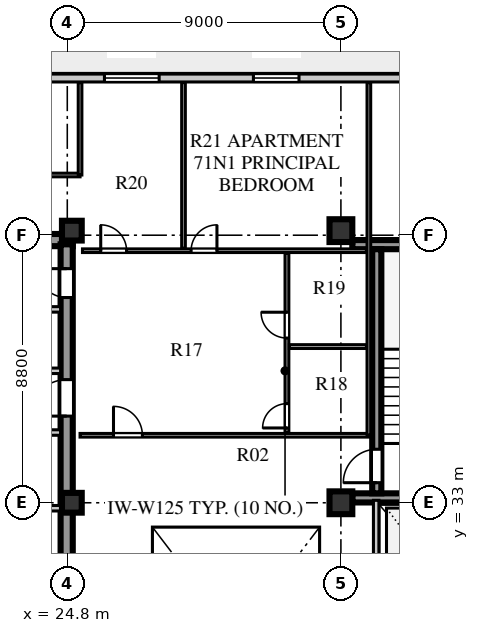
"""IFC4 building model, lengths in metres.
Left out: names, types, materials, properties, quantities, classifications, styles, units other than length and angle.
Written with IfcOpenShell. Run it as: python <this file> out.ifc"""

import sys

from ifc_helpers import new_model, si_unit, direction, frame, frame_2d, origin, origin_2d, place, context, subcontext, project, spatial, rectangle, extrude, element, fill, save


model = new_model("IFC4")
c1 = context("Model", 3, precision=1e-05, world=origin(), true_north=direction((0.0, 1.0)))
c2 = subcontext(c1, "Body", "Model", "MODEL_VIEW")
j1 = project(units=[si_unit("LENGTHUNIT", "METRE"), si_unit("PLANEANGLEUNIT", "RADIAN")], contexts=[c1])
p1 = place(None, origin())
s1 = spatial("IfcSite", under=j1, at=p1, CompositionType="ELEMENT")
p2 = place(p1, origin())
s2 = spatial("IfcBuilding", under=s1, at=p2, CompositionType="ELEMENT")
p3 = place(p2, frame((0.0, 0.0, 288.2)))
s3 = spatial("IfcBuildingStorey", under=s2, at=p3, CompositionType="ELEMENT", Elevation=288.2)
p4 = place(p3, frame((15.5, 41.64, 0.0), z_axis=(0.0, 0.0, 1.0), x_axis=(1.0, 0.0, 0.0)))
e1 = element("IfcWall", 1, at=p4, inside=s3, PredefinedType="SHEAR", context=c2, shape_type="SweptSolid", body=[
    extrude(rectangle(XDim=9.48, YDim=0.4, at=frame_2d((4.74, 0.0))), origin(), (0.0, 0.0, 1.0), 3.66),
])
p5 = place(p3, frame((24.78, 15.74, 0.0), z_axis=(0.0, 0.0, 1.0), x_axis=(0.0, 1.0, 0.0)))
e2 = element("IfcWall", 2, at=p5, inside=s3, PredefinedType="SHEAR", context=c2, shape_type="SweptSolid", body=[
    extrude(rectangle(XDim=25.76, YDim=0.4, at=frame_2d((12.88, 0.0))), origin(), (0.0, 0.0, 1.0), 3.66),
])
p6 = place(p5, frame((1.61, 0.0, 0.0)))
e3 = element("IfcOpeningElement", 3, at=p6, cuts=e2, PredefinedType="OPENING", context=c2, shape_type="SweptSolid", body=[
    extrude(rectangle(XDim=1.2, YDim=2.1, at=frame_2d((0.6, 1.05))), frame((0.0, 0.21, 0.0), z_axis=(0.0, -1.0, 0.0), x_axis=(1.0, 0.0, 0.0)), (0.0, 0.0, 1.0), 0.42),
])
p7 = place(p5, frame((6.78, 0.0, 0.0)))
e4 = element("IfcOpeningElement", 4, at=p7, cuts=e2, PredefinedType="OPENING", context=c2, shape_type="SweptSolid", body=[
    extrude(rectangle(XDim=0.85, YDim=2.06, at=frame_2d((0.425, 1.03))), frame((0.0, 0.21, 0.0), z_axis=(0.0, -1.0, 0.0), x_axis=(1.0, 0.0, 0.0)), (0.0, 0.0, 1.0), 0.42),
])
p8 = place(p5, frame((12.11, 0.0, 0.0)))
e5 = element("IfcOpeningElement", 5, at=p8, cuts=e2, PredefinedType="OPENING", context=c2, shape_type="SweptSolid", body=[
    extrude(rectangle(XDim=1.5, YDim=2.12, at=frame_2d((0.75, 1.06))), frame((0.0, 0.21, 0.0), z_axis=(0.0, -1.0, 0.0), x_axis=(1.0, 0.0, 0.0)), (0.0, 0.0, 1.0), 0.42),
])
p9 = place(p5, frame((20.11, 0.0, 0.0)))
e6 = element("IfcOpeningElement", 6, at=p9, cuts=e2, PredefinedType="OPENING", context=c2, shape_type="SweptSolid", body=[
    extrude(rectangle(XDim=1.2, YDim=2.12, at=frame_2d((0.6, 1.06))), frame((0.0, 0.21, 0.0), z_axis=(0.0, -1.0, 0.0), x_axis=(1.0, 0.0, 0.0)), (0.0, 0.0, 1.0), 0.42),
])
p10 = place(p5, frame((24.01, 0.0, 0.0)))
e7 = element("IfcOpeningElement", 7, at=p10, cuts=e2, PredefinedType="OPENING", context=c2, shape_type="SweptSolid", body=[
    extrude(rectangle(XDim=0.95, YDim=2.1, at=frame_2d((0.475, 1.05))), frame((0.0, 0.21, 0.0), z_axis=(0.0, -1.0, 0.0), x_axis=(1.0, 0.0, 0.0)), (0.0, 0.0, 1.0), 0.42),
])
for number, where, z_axis, x_axis in (
    (8, (34.175, 33.16, 0.0), (0.0, 0.0, 1.0), (1.0, 0.0, 0.0)),
    (9, (34.175, 41.49, 0.0), (0.0, 0.0, 1.0), (1.0, 0.0, 0.0)),
):
    element("IfcWall", number, at=place(p3, frame(where, z_axis=z_axis, x_axis=x_axis)), inside=s3, PredefinedType="SHEAR", context=c2, shape_type="SweptSolid", body=[
        extrude(rectangle(XDim=4.695, YDim=0.3, at=frame_2d((2.348, 0.0))), origin(), (0.0, 0.0, 1.0), 3.66),
    ])
p11 = place(p3, frame((34.98, 33.31, 0.0), z_axis=(0.0, 0.0, 1.0), x_axis=(0.0, 1.0, 0.0)))
e10 = element("IfcWall", 10, at=p11, inside=s3, PredefinedType="SHEAR", context=c2, shape_type="SweptSolid", body=[
    extrude(rectangle(XDim=8.03, YDim=0.3, at=frame_2d((4.015, 0.0))), origin(), (0.0, 0.0, 1.0), 3.66),
])
p12 = place(p11, frame((0.35, 0.0, 0.0)))
e11 = element("IfcOpeningElement", 11, at=p12, cuts=e10, PredefinedType="OPENING", context=c2, shape_type="SweptSolid", body=[
    extrude(rectangle(XDim=1.1, YDim=2.1, at=frame_2d((0.55, 1.05))), frame((0.0, 0.16, 0.0), z_axis=(0.0, -1.0, 0.0), x_axis=(1.0, 0.0, 0.0)), (0.0, 0.0, 1.0), 0.32),
])
for number, where, z_axis, x_axis in (
    (12, (24.95, 33.0, 0.0), (0.0, 0.0, 1.0), (1.0, 0.0, 0.0)),
    (13, (24.95, 41.95, 0.0), (0.0, 0.0, 1.0), (1.0, 0.0, 0.0)),
):
    element("IfcColumn", number, at=place(p3, frame(where, z_axis=z_axis, x_axis=x_axis)), inside=s3, PredefinedType="COLUMN", context=c2, shape_type="SweptSolid", body=[
        extrude(rectangle(XDim=0.65, YDim=0.65, at=origin_2d()), origin(), (0.0, 0.0, 1.0), 3.66),
    ])
for number, where, z_axis, x_axis in (
    (14, (33.8, 33.0, 0.0), (0.0, 0.0, 1.0), (1.0, 0.0, 0.0)),
    (15, (33.8, 41.95, 0.0), (0.0, 0.0, 1.0), (1.0, 0.0, 0.0)),
):
    element("IfcColumn", number, at=place(p3, frame(where, z_axis=z_axis, x_axis=x_axis)), inside=s3, PredefinedType="COLUMN", context=c2, shape_type="SweptSolid", body=[
        extrude(rectangle(XDim=0.75, YDim=0.75, at=origin_2d()), origin(), (0.0, 0.0, 1.0), 3.66),
    ])
p13 = place(p3, frame((45.15, 46.97, 0.0), z_axis=(0.0, 0.0, 1.0), x_axis=(-1.0, 0.0, 0.0)))
e16 = element("IfcWall", 16, at=p13, inside=s3, PredefinedType="SOLIDWALL", context=c2, shape_type="SweptSolid", body=[
    extrude(rectangle(XDim=31.7, YDim=0.26, at=frame_2d((15.85, 0.0))), origin(), (0.0, 0.0, 1.0), 3.66),
])
p14 = place(p13, frame((29.75, 0.0, 0.0)))
e17 = element("IfcOpeningElement", 17, at=p14, cuts=e16, PredefinedType="OPENING", context=c2, shape_type="SweptSolid", body=[
    extrude(rectangle(XDim=1.0, YDim=2.05, at=frame_2d((0.5, 1.025))), frame((0.0, 0.14, 0.0), z_axis=(0.0, -1.0, 0.0), x_axis=(1.0, 0.0, 0.0)), (0.0, 0.0, 1.0), 0.28),
])
p15 = place(p13, frame((23.74, 0.0, 0.8)))
e18 = element("IfcOpeningElement", 18, at=p15, cuts=e16, PredefinedType="OPENING", context=c2, shape_type="SweptSolid", body=[
    extrude(rectangle(XDim=2.25, YDim=2.0, at=frame_2d((1.125, 1.0))), frame((0.0, 0.14, 0.0), z_axis=(0.0, -1.0, 0.0), x_axis=(1.0, 0.0, 0.0)), (0.0, 0.0, 1.0), 0.28),
])
p16 = place(p13, frame((17.328, 0.0, 0.8)))
e19 = element("IfcOpeningElement", 19, at=p16, cuts=e16, PredefinedType="OPENING", context=c2, shape_type="SweptSolid", body=[
    extrude(rectangle(XDim=1.8, YDim=2.0, at=frame_2d((0.9, 1.0))), frame((0.0, 0.14, 0.0), z_axis=(0.0, -1.0, 0.0), x_axis=(1.0, 0.0, 0.0)), (0.0, 0.0, 1.0), 0.28),
])
p17 = place(p13, frame((12.728, 0.0, 0.8)))
e20 = element("IfcOpeningElement", 20, at=p17, cuts=e16, PredefinedType="OPENING", context=c2, shape_type="SweptSolid", body=[
    extrude(rectangle(XDim=1.5, YDim=2.0, at=frame_2d((0.75, 1.0))), frame((0.0, 0.14, 0.0), z_axis=(0.0, -1.0, 0.0), x_axis=(1.0, 0.0, 0.0)), (0.0, 0.0, 1.0), 0.28),
])
p18 = place(p13, frame((4.67, 0.0, 0.8)))
e21 = element("IfcOpeningElement", 21, at=p18, cuts=e16, PredefinedType="OPENING", context=c2, shape_type="SweptSolid", body=[
    extrude(rectangle(XDim=1.2, YDim=1.75, at=frame_2d((0.6, 0.875))), frame((0.0, 0.14, 0.0), z_axis=(0.0, -1.0, 0.0), x_axis=(1.0, 0.0, 0.0)), (0.0, 0.0, 1.0), 0.28),
])
p19 = place(p3, frame((15.9, 32.82, 0.0), z_axis=(0.0, 0.0, 1.0), x_axis=(1.0, 0.0, 0.0)))
e22 = element("IfcWall", 22, at=p19, inside=s3, PredefinedType="SOLIDWALL", context=c2, shape_type="SweptSolid", body=[
    extrude(rectangle(XDim=8.68, YDim=0.18, at=frame_2d((4.34, 0.0))), origin(), (0.0, 0.0, 1.0), 3.06),
])
p20 = place(p3, frame((22.02, 35.31, 0.0), z_axis=(0.0, 0.0, 1.0), x_axis=(1.0, 0.0, 0.0)))
e23 = element("IfcWall", 23, at=p20, inside=s3, PredefinedType="SOLIDWALL", context=c2, shape_type="SweptSolid", body=[
    extrude(rectangle(XDim=2.56, YDim=0.18, at=frame_2d((1.28, 0.0))), origin(), (0.0, 0.0, 1.0), 3.66),
])
p21 = place(p20, frame((0.55, 0.0, 0.0)))
e24 = element("IfcOpeningElement", 24, at=p21, cuts=e23, PredefinedType="OPENING", context=c2, shape_type="SweptSolid", body=[
    extrude(rectangle(XDim=1.0, YDim=2.1, at=frame_2d((0.5, 1.05))), frame((0.0, 0.1, 0.0), z_axis=(0.0, -1.0, 0.0), x_axis=(1.0, 0.0, 0.0)), (0.0, 0.0, 1.0), 0.2),
])
p22 = place(p3, frame((19.64, 37.34, 0.0), z_axis=(0.0, 0.0, 1.0), x_axis=(1.0, 0.0, 0.0)))
e25 = element("IfcWall", 25, at=p22, inside=s3, PredefinedType="SOLIDWALL", context=c2, shape_type="SweptSolid", body=[
    extrude(rectangle(XDim=4.94, YDim=0.18, at=frame_2d((2.47, 0.0))), origin(), (0.0, 0.0, 1.0), 3.66),
])
p23 = place(p22, frame((0.45, 0.0, 0.0)))
e26 = element("IfcOpeningElement", 26, at=p23, cuts=e25, PredefinedType="OPENING", context=c2, shape_type="SweptSolid", body=[
    extrude(rectangle(XDim=1.0, YDim=2.1, at=frame_2d((0.5, 1.05))), frame((0.0, 0.1, 0.0), z_axis=(0.0, -1.0, 0.0), x_axis=(1.0, 0.0, 0.0)), (0.0, 0.0, 1.0), 0.2),
])
p24 = place(p22, frame((2.5, 0.0, 0.0)))
e27 = element("IfcOpeningElement", 27, at=p24, cuts=e25, PredefinedType="OPENING", context=c2, shape_type="SweptSolid", body=[
    extrude(rectangle(XDim=1.0, YDim=2.1, at=frame_2d((0.5, 1.05))), frame((0.0, 0.1, 0.0), z_axis=(0.0, -1.0, 0.0), x_axis=(1.0, 0.0, 0.0)), (0.0, 0.0, 1.0), 0.2),
])
p25 = place(p3, frame((19.64, 39.36, 0.0), z_axis=(0.0, 0.0, 1.0), x_axis=(1.0, 0.0, 0.0)))
e28 = element("IfcWall", 28, at=p25, inside=s3, PredefinedType="SOLIDWALL", context=c2, shape_type="SweptSolid", body=[
    extrude(rectangle(XDim=4.94, YDim=0.18, at=frame_2d((2.47, 0.0))), origin(), (0.0, 0.0, 1.0), 3.66),
])
p26 = place(p3, frame((34.96, 28.86, 0.0), z_axis=(0.0, 0.0, 1.0), x_axis=(0.0, 1.0, 0.0)))
e29 = element("IfcWall", 29, at=p26, inside=s3, PredefinedType="SOLIDWALL", context=c2, shape_type="SweptSolid", body=[
    extrude(rectangle(XDim=4.22, YDim=0.18, at=frame_2d((2.11, 0.0))), origin(), (0.0, 0.0, 1.0), 3.66),
])
p27 = place(p3, frame((25.22, 35.22, 0.0), z_axis=(0.0, 0.0, 1.0), x_axis=(1.0, 0.0, 0.0)))
e30 = element("IfcWall", 30, at=p27, inside=s3, PredefinedType="PARTITIONING", context=c2, shape_type="SweptSolid", body=[
    extrude(rectangle(XDim=9.5, YDim=0.12, at=frame_2d((4.75, 0.0))), origin(), (0.0, 0.0, 1.0), 3.66),
])
p28 = place(p27, frame((1.1, 0.0, 0.0)))
e31 = element("IfcOpeningElement", 31, at=p28, cuts=e30, PredefinedType="OPENING", context=c2, shape_type="SweptSolid", body=[
    extrude(rectangle(XDim=0.95, YDim=2.1, at=frame_2d((0.475, 1.05))), frame((0.0, 0.07, 0.0), z_axis=(0.0, -1.0, 0.0), x_axis=(1.0, 0.0, 0.0)), (0.0, 0.0, 1.0), 0.14),
])
p29 = place(p3, frame((13.8, 43.78, 0.0), z_axis=(0.0, 0.0, 1.0), x_axis=(1.0, 0.0, 0.0)))
e32 = element("IfcWall", 32, at=p29, inside=s3, PredefinedType="PARTITIONING", context=c2, shape_type="SweptSolid", body=[
    extrude(rectangle(XDim=11.42, YDim=0.12, at=frame_2d((5.71, 0.0))), origin(), (0.0, 0.0, 1.0), 3.66),
])
p30 = place(p29, frame((3.2, 0.0, 0.0)))
e33 = element("IfcOpeningElement", 33, at=p30, cuts=e32, PredefinedType="OPENING", context=c2, shape_type="SweptSolid", body=[
    extrude(rectangle(XDim=0.95, YDim=2.08, at=frame_2d((0.475, 1.04))), frame((0.0, 0.07, 0.0), z_axis=(0.0, -1.0, 0.0), x_axis=(1.0, 0.0, 0.0)), (0.0, 0.0, 1.0), 0.14),
])
p31 = place(p3, frame((25.22, 43.78, 0.0), z_axis=(0.0, 0.0, 1.0), x_axis=(0.0, 1.0, 0.0)))
e34 = element("IfcWall", 34, at=p31, inside=s3, PredefinedType="PARTITIONING", context=c2, shape_type="SweptSolid", body=[
    extrude(rectangle(XDim=3.04, YDim=0.12, at=frame_2d((1.52, 0.0))), origin(), (0.0, 0.0, 1.0), 3.21),
])
p32 = place(p3, frame((34.72, 35.22, 0.0), z_axis=(0.0, 0.0, 1.0), x_axis=(0.0, 1.0, 0.0)))
e35 = element("IfcWall", 35, at=p32, inside=s3, PredefinedType="PARTITIONING", context=c2, shape_type="SweptSolid", body=[
    extrude(rectangle(XDim=11.6, YDim=0.12, at=frame_2d((5.8, 0.0))), origin(), (0.0, 0.0, 1.0), 3.66),
])
p33 = place(p3, frame((25.3, 41.29, 0.0), z_axis=(0.0, 0.0, 1.0), x_axis=(1.0, 0.0, 0.0)))
e36 = element("IfcWall", 36, at=p33, inside=s3, PredefinedType="PARTITIONING", context=c2, shape_type="SweptSolid", body=[
    extrude(rectangle(XDim=9.34, YDim=0.12, at=frame_2d((4.67, 0.0))), origin(), (0.0, 0.0, 1.0), 3.66),
])
p34 = place(p33, frame((0.6, 0.0, 0.0)))
e37 = element("IfcOpeningElement", 37, at=p34, cuts=e36, PredefinedType="OPENING", context=c2, shape_type="SweptSolid", body=[
    extrude(rectangle(XDim=0.85, YDim=2.08, at=frame_2d((0.425, 1.04))), frame((0.0, 0.07, 0.0), z_axis=(0.0, -1.0, 0.0), x_axis=(1.0, 0.0, 0.0)), (0.0, 0.0, 1.0), 0.14),
])
p35 = place(p33, frame((3.573, 0.0, 0.0)))
e38 = element("IfcOpeningElement", 38, at=p35, cuts=e36, PredefinedType="OPENING", context=c2, shape_type="SweptSolid", body=[
    extrude(rectangle(XDim=0.85, YDim=2.08, at=frame_2d((0.425, 1.04))), frame((0.0, 0.07, 0.0), z_axis=(0.0, -1.0, 0.0), x_axis=(1.0, 0.0, 0.0)), (0.0, 0.0, 1.0), 0.14),
])
p36 = place(p3, frame((32.025, 35.3, 0.0), z_axis=(0.0, 0.0, 1.0), x_axis=(0.0, 1.0, 0.0)))
e39 = element("IfcWall", 39, at=p36, inside=s3, PredefinedType="PLUMBINGWALL", context=c2, shape_type="SweptSolid", body=[
    extrude(rectangle(XDim=5.91, YDim=0.125, at=frame_2d((2.955, 0.0))), origin(), (0.0, 0.0, 1.0), 3.66),
])
p37 = place(p36, frame((0.16, 0.0, 0.0)))
e40 = element("IfcOpeningElement", 40, at=p37, cuts=e39, PredefinedType="OPENING", context=c2, shape_type="SweptSolid", body=[
    extrude(rectangle(XDim=0.8, YDim=2.05, at=frame_2d((0.4, 1.025))), frame((0.0, 0.073, 0.0), z_axis=(0.0, -1.0, 0.0), x_axis=(1.0, 0.0, 0.0)), (0.0, 0.0, 1.0), 0.145),
])
p38 = place(p36, frame((3.117, 0.0, 0.0)))
e41 = element("IfcOpeningElement", 41, at=p38, cuts=e39, PredefinedType="OPENING", context=c2, shape_type="SweptSolid", body=[
    extrude(rectangle(XDim=0.85, YDim=2.08, at=frame_2d((0.425, 1.04))), frame((0.0, 0.073, 0.0), z_axis=(0.0, -1.0, 0.0), x_axis=(1.0, 0.0, 0.0)), (0.0, 0.0, 1.0), 0.145),
])
p39 = place(p3, frame((32.105, 38.137, 0.0), z_axis=(0.0, 0.0, 1.0), x_axis=(1.0, 0.0, 0.0)))
e42 = element("IfcWall", 42, at=p39, inside=s3, PredefinedType="PLUMBINGWALL", context=c2, shape_type="SweptSolid", body=[
    extrude(rectangle(XDim=2.535, YDim=0.125, at=frame_2d((1.268, 0.0))), origin(), (0.0, 0.0, 1.0), 3.66),
])
p40 = place(p3, frame((28.623, 41.37, 0.0), z_axis=(0.0, 0.0, 1.0), x_axis=(0.0, 1.0, 0.0)))
e43 = element("IfcWall", 43, at=p40, inside=s3, PredefinedType="PARTITIONING", context=c2, shape_type="SweptSolid", body=[
    extrude(rectangle(XDim=5.45, YDim=0.12, at=frame_2d((2.725, 0.0))), origin(), (0.0, 0.0, 1.0), 3.66),
])
p41 = place(p16, origin())
e44 = element("IfcWindow", 44, at=p41, inside=s3, PartitioningType="SINGLE_PANEL", PredefinedType="WINDOW", context=c2, shape_type="SweptSolid", body=[
    extrude(rectangle(XDim=1.8, YDim=2.0, at=frame_2d((0.9, 1.0))), frame((0.0, 0.03, 0.0), z_axis=(0.0, -1.0, 0.0), x_axis=(1.0, 0.0, 0.0)), (0.0, 0.0, 1.0), 0.06),
])
fill(e19, e44)
p42 = place(p17, origin())
e45 = element("IfcWindow", 45, at=p42, inside=s3, PartitioningType="SINGLE_PANEL", PredefinedType="WINDOW", context=c2, shape_type="SweptSolid", body=[
    extrude(rectangle(XDim=1.5, YDim=2.0, at=frame_2d((0.75, 1.0))), frame((0.0, 0.03, 0.0), z_axis=(0.0, -1.0, 0.0), x_axis=(1.0, 0.0, 0.0)), (0.0, 0.0, 1.0), 0.06),
])
fill(e20, e45)
p43 = place(p9, frame((1.2, 0.0, 0.0), z_axis=(0.0, 0.0, 1.0), x_axis=(-1.0, 0.0, 0.0)))
e46 = element("IfcDoor", 46, at=p43, inside=s3, OperationType="SINGLE_SWING_RIGHT", PredefinedType="DOOR", context=c2, shape_type="SweptSolid", body=[
    extrude(rectangle(XDim=1.2, YDim=2.12, at=frame_2d((0.6, 1.06))), frame((0.0, 0.025, 0.0), z_axis=(0.0, -1.0, 0.0), x_axis=(1.0, 0.0, 0.0)), (0.0, 0.0, 1.0), 0.05),
])
fill(e6, e46)
p44 = place(p10, frame((0.95, 0.0, 0.0), z_axis=(0.0, 0.0, 1.0), x_axis=(-1.0, 0.0, 0.0)))
e47 = element("IfcDoor", 47, at=p44, inside=s3, OperationType="SINGLE_SWING_LEFT", PredefinedType="DOOR", context=c2, shape_type="SweptSolid", body=[
    extrude(rectangle(XDim=0.95, YDim=2.1, at=frame_2d((0.475, 1.05))), frame((0.0, 0.025, 0.0), z_axis=(0.0, -1.0, 0.0), x_axis=(1.0, 0.0, 0.0)), (0.0, 0.0, 1.0), 0.05),
])
fill(e7, e47)
p45 = place(p12, origin())
e48 = element("IfcDoor", 48, at=p45, inside=s3, OperationType="SINGLE_SWING_LEFT", PredefinedType="DOOR", context=c2, shape_type="SweptSolid", body=[
    extrude(rectangle(XDim=1.1, YDim=2.1, at=frame_2d((0.55, 1.05))), frame((0.0, 0.025, 0.0), z_axis=(0.0, -1.0, 0.0), x_axis=(1.0, 0.0, 0.0)), (0.0, 0.0, 1.0), 0.05),
])
fill(e11, e48)
p46 = place(p37, origin())
e49 = element("IfcDoor", 49, at=p46, inside=s3, OperationType="SINGLE_SWING_LEFT", PredefinedType="DOOR", context=c2, shape_type="SweptSolid", body=[
    extrude(rectangle(XDim=0.8, YDim=2.05, at=frame_2d((0.4, 1.025))), frame((0.0, 0.025, 0.0), z_axis=(0.0, -1.0, 0.0), x_axis=(1.0, 0.0, 0.0)), (0.0, 0.0, 1.0), 0.05),
])
fill(e40, e49)
p47 = place(p38, origin())
e50 = element("IfcDoor", 50, at=p47, inside=s3, OperationType="SINGLE_SWING_RIGHT", PredefinedType="DOOR", context=c2, shape_type="SweptSolid", body=[
    extrude(rectangle(XDim=0.85, YDim=2.08, at=frame_2d((0.425, 1.04))), frame((0.0, 0.025, 0.0), z_axis=(0.0, -1.0, 0.0), x_axis=(1.0, 0.0, 0.0)), (0.0, 0.0, 1.0), 0.05),
])
fill(e41, e50)
p48 = place(p34, origin())
e51 = element("IfcDoor", 51, at=p48, inside=s3, OperationType="SINGLE_SWING_LEFT", PredefinedType="DOOR", context=c2, shape_type="SweptSolid", body=[
    extrude(rectangle(XDim=0.85, YDim=2.08, at=frame_2d((0.425, 1.04))), frame((0.0, 0.025, 0.0), z_axis=(0.0, -1.0, 0.0), x_axis=(1.0, 0.0, 0.0)), (0.0, 0.0, 1.0), 0.05),
])
fill(e37, e51)
p49 = place(p35, origin())
e52 = element("IfcDoor", 52, at=p49, inside=s3, OperationType="SINGLE_SWING_RIGHT", PredefinedType="DOOR", context=c2, shape_type="SweptSolid", body=[
    extrude(rectangle(XDim=0.85, YDim=2.08, at=frame_2d((0.425, 1.04))), frame((0.0, 0.025, 0.0), z_axis=(0.0, -1.0, 0.0), x_axis=(1.0, 0.0, 0.0)), (0.0, 0.0, 1.0), 0.05),
])
fill(e38, e52)
p50 = place(p28, origin())
e53 = element("IfcDoor", 53, at=p50, inside=s3, OperationType="SINGLE_SWING_LEFT", PredefinedType="DOOR", context=c2, shape_type="SweptSolid", body=[
    extrude(rectangle(XDim=0.95, YDim=2.1, at=frame_2d((0.475, 1.05))), frame((0.0, 0.025, 0.0), z_axis=(0.0, -1.0, 0.0), x_axis=(1.0, 0.0, 0.0)), (0.0, 0.0, 1.0), 0.05),
])
fill(e31, e53)
save(model, sys.argv[1])
